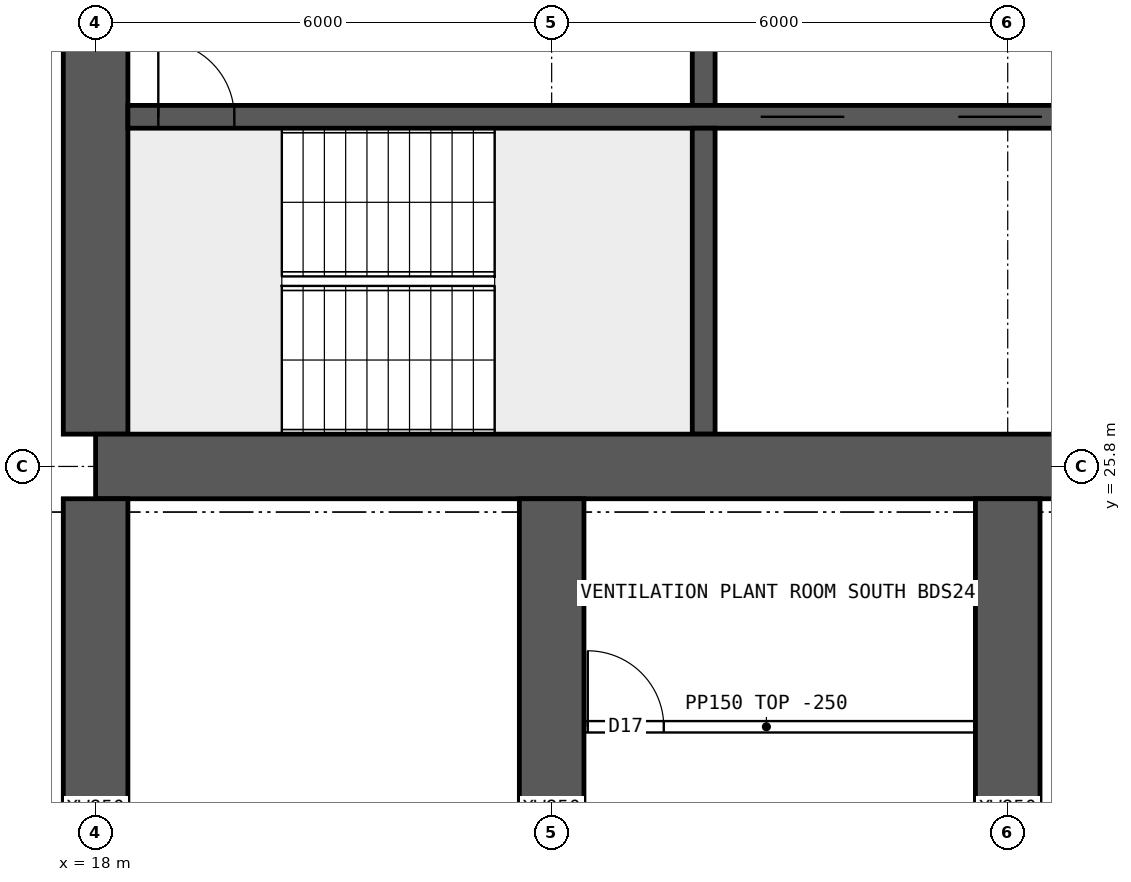
"""IFC4 building model, lengths in metres.
Left out: names, types, materials, properties, quantities, classifications, styles, units other than length and angle.
Written with IfcOpenShell. Run it as: python <this file> out.ifc"""

import sys

from ifc_helpers import new_model, si_unit, direction, frame, frame_2d, origin, place, context, subcontext, project, spatial, rectangle, extrude, element, fill, save


model = new_model("IFC4")
c1 = context("Model", 3, precision=1e-05, world=origin(), true_north=direction((0.0, 1.0)))
c2 = subcontext(c1, "Body", "Model", "MODEL_VIEW")
j1 = project(units=[si_unit("LENGTHUNIT", "METRE"), si_unit("PLANEANGLEUNIT", "RADIAN")], contexts=[c1])
p1 = place(None, origin())
s1 = spatial("IfcSite", under=j1, at=p1, CompositionType="ELEMENT")
p2 = place(p1, origin())
s2 = spatial("IfcBuilding", under=s1, at=p2, CompositionType="ELEMENT")
p3 = place(p2, frame((0.0, 0.0, 186.1)))
s3 = spatial("IfcBuildingStorey", under=s2, at=p3, CompositionType="ELEMENT", Elevation=186.1)
p4 = place(p3, frame((18.0, 25.8, 0.0), z_axis=(0.0, 0.0, 1.0), x_axis=(1.0, 0.0, 0.0)))
e1 = element("IfcWall", 1, at=p4, inside=s3, PredefinedType="SHEAR", context=c2, shape_type="SweptSolid", body=[
    extrude(rectangle(XDim=48.0, YDim=0.85, at=frame_2d((24.0, 0.0))), origin(), (0.0, 0.0, 1.0), 3.75),
])
p5 = place(p3, frame((18.0, 26.225, 0.0), z_axis=(0.0, 0.0, 1.0), x_axis=(0.0, 1.0, 0.0)))
e2 = element("IfcWall", 2, at=p5, inside=s3, PredefinedType="SHEAR", context=c2, shape_type="SweptSolid", body=[
    extrude(rectangle(XDim=11.55, YDim=0.85, at=frame_2d((5.775, 0.0))), origin(), (0.0, 0.0, 1.0), 3.75),
])
p6 = place(p5, frame((5.075, 0.0, 0.0)))
e3 = element("IfcOpeningElement", 3, at=p6, cuts=e2, PredefinedType="OPENING", context=c2, shape_type="SweptSolid", body=[
    extrude(rectangle(XDim=1.2, YDim=2.1, at=frame_2d((0.6, 1.05))), frame((0.0, 0.435, 0.0), z_axis=(0.0, -1.0, 0.0), x_axis=(1.0, 0.0, 0.0)), (0.0, 0.0, 1.0), 0.87),
])
p7 = place(p3, frame((18.425, 30.4, 0.0), z_axis=(0.0, 0.0, 1.0), x_axis=(1.0, 0.0, 0.0)))
e4 = element("IfcWall", 4, at=p7, inside=s3, PredefinedType="SHEAR", context=c2, shape_type="SweptSolid", body=[
    extrude(rectangle(XDim=47.15, YDim=0.3, at=frame_2d((23.575, 0.0))), origin(), (0.0, 0.0, 1.0), 3.75),
])
p8 = place(p7, frame((0.4, 0.0, 0.0)))
e5 = element("IfcOpeningElement", 5, at=p8, cuts=e4, PredefinedType="OPENING", context=c2, shape_type="SweptSolid", body=[
    extrude(rectangle(XDim=1.0, YDim=2.1, at=frame_2d((0.5, 1.05))), frame((0.0, 0.16, 0.0), z_axis=(0.0, -1.0, 0.0), x_axis=(1.0, 0.0, 0.0)), (0.0, 0.0, 1.0), 0.32),
])
p9 = place(p7, frame((45.75, 0.0, 0.0)))
e6 = element("IfcOpeningElement", 6, at=p9, cuts=e4, PredefinedType="OPENING", context=c2, shape_type="SweptSolid", body=[
    extrude(rectangle(XDim=1.0, YDim=2.1, at=frame_2d((0.5, 1.05))), frame((0.0, 0.16, 0.0), z_axis=(0.0, -1.0, 0.0), x_axis=(1.0, 0.0, 0.0)), (0.0, 0.0, 1.0), 0.32),
])
p10 = place(p7, frame((8.325, 0.0, 0.0)))
e7 = element("IfcOpeningElement", 7, at=p10, cuts=e4, PredefinedType="OPENING", context=c2, shape_type="SweptSolid", body=[
    extrude(rectangle(XDim=1.1, YDim=2.1, at=frame_2d((0.55, 1.05))), frame((0.0, 0.16, 0.0), z_axis=(0.0, -1.0, 0.0), x_axis=(1.0, 0.0, 0.0)), (0.0, 0.0, 1.0), 0.32),
])
p11 = place(p7, frame((10.925, 0.0, 0.0)))
e8 = element("IfcOpeningElement", 8, at=p11, cuts=e4, PredefinedType="OPENING", context=c2, shape_type="SweptSolid", body=[
    extrude(rectangle(XDim=1.1, YDim=2.1, at=frame_2d((0.55, 1.05))), frame((0.0, 0.16, 0.0), z_axis=(0.0, -1.0, 0.0), x_axis=(1.0, 0.0, 0.0)), (0.0, 0.0, 1.0), 0.32),
])
p12 = place(p7, frame((13.525, 0.0, 0.0)))
e9 = element("IfcOpeningElement", 9, at=p12, cuts=e4, PredefinedType="OPENING", context=c2, shape_type="SweptSolid", body=[
    extrude(rectangle(XDim=1.1, YDim=2.1, at=frame_2d((0.55, 1.05))), frame((0.0, 0.16, 0.0), z_axis=(0.0, -1.0, 0.0), x_axis=(1.0, 0.0, 0.0)), (0.0, 0.0, 1.0), 0.32),
])
p13 = place(p7, frame((16.125, 0.0, 0.0)))
e10 = element("IfcOpeningElement", 10, at=p13, cuts=e4, PredefinedType="OPENING", context=c2, shape_type="SweptSolid", body=[
    extrude(rectangle(XDim=1.1, YDim=2.1, at=frame_2d((0.55, 1.05))), frame((0.0, 0.16, 0.0), z_axis=(0.0, -1.0, 0.0), x_axis=(1.0, 0.0, 0.0)), (0.0, 0.0, 1.0), 0.32),
])
p14 = place(p7, frame((18.9, 0.0, 0.0)))
e11 = element("IfcOpeningElement", 11, at=p14, cuts=e4, PredefinedType="OPENING", context=c2, shape_type="SweptSolid", body=[
    extrude(rectangle(XDim=0.9, YDim=2.1, at=frame_2d((0.45, 1.05))), frame((0.0, 0.16, 0.0), z_axis=(0.0, -1.0, 0.0), x_axis=(1.0, 0.0, 0.0)), (0.0, 0.0, 1.0), 0.32),
])
p15 = place(p7, frame((30.192, 0.0, 0.0)))
e12 = element("IfcOpeningElement", 12, at=p15, cuts=e4, PredefinedType="OPENING", context=c2, shape_type="SweptSolid", body=[
    extrude(rectangle(XDim=1.1, YDim=2.1, at=frame_2d((0.55, 1.05))), frame((0.0, 0.16, 0.0), z_axis=(0.0, -1.0, 0.0), x_axis=(1.0, 0.0, 0.0)), (0.0, 0.0, 1.0), 0.32),
])
p16 = place(p7, frame((33.725, 0.0, 0.0)))
e13 = element("IfcOpeningElement", 13, at=p16, cuts=e4, PredefinedType="OPENING", context=c2, shape_type="SweptSolid", body=[
    extrude(rectangle(XDim=1.1, YDim=2.1, at=frame_2d((0.55, 1.05))), frame((0.0, 0.16, 0.0), z_axis=(0.0, -1.0, 0.0), x_axis=(1.0, 0.0, 0.0)), (0.0, 0.0, 1.0), 0.32),
])
p17 = place(p7, frame((37.258, 0.0, 0.0)))
e14 = element("IfcOpeningElement", 14, at=p17, cuts=e4, PredefinedType="OPENING", context=c2, shape_type="SweptSolid", body=[
    extrude(rectangle(XDim=1.1, YDim=2.1, at=frame_2d((0.55, 1.05))), frame((0.0, 0.16, 0.0), z_axis=(0.0, -1.0, 0.0), x_axis=(1.0, 0.0, 0.0)), (0.0, 0.0, 1.0), 0.32),
])
p18 = place(p3, frame((26.0, 26.225, 0.0), z_axis=(0.0, 0.0, 1.0), x_axis=(0.0, 1.0, 0.0)))
e15 = element("IfcWall", 15, at=p18, inside=s3, PredefinedType="SHEAR", context=c2, shape_type="SweptSolid", body=[
    extrude(rectangle(XDim=4.025, YDim=0.3, at=frame_2d((2.012, 0.0))), origin(), (0.0, 0.0, 1.0), 3.75),
])
p19 = place(p3, frame((26.0, 30.55, 0.0), z_axis=(0.0, 0.0, 1.0), x_axis=(0.0, 1.0, 0.0)))
e16 = element("IfcWall", 16, at=p19, inside=s3, PredefinedType="SHEAR", context=c2, shape_type="SweptSolid", body=[
    extrude(rectangle(XDim=3.9, YDim=0.3, at=frame_2d((1.95, 0.0))), origin(), (0.0, 0.0, 1.0), 3.75),
])
p20 = place(p19, frame((1.4, 0.0, 0.0)))
e17 = element("IfcOpeningElement", 17, at=p20, cuts=e16, PredefinedType="OPENING", context=c2, shape_type="SweptSolid", body=[
    extrude(rectangle(XDim=1.2, YDim=2.1, at=frame_2d((0.6, 1.05))), frame((0.0, 0.16, 0.0), z_axis=(0.0, -1.0, 0.0), x_axis=(1.0, 0.0, 0.0)), (0.0, 0.0, 1.0), 0.32),
])
for number, where, z_axis, x_axis in (
    (18, (18.0, 17.2, 0.0), (0.0, 0.0, 1.0), (0.0, 1.0, 0.0)),
    (19, (24.0, 17.2, 0.0), (0.0, 0.0, 1.0), (0.0, 1.0, 0.0)),
    (20, (30.0, 17.2, 0.0), (0.0, 0.0, 1.0), (0.0, 1.0, 0.0)),
):
    element("IfcWall", number, at=place(p3, frame(where, z_axis=z_axis, x_axis=x_axis)), inside=s3, PredefinedType="SHEAR", context=c2, shape_type="SweptSolid", body=[
        extrude(rectangle(XDim=8.175, YDim=0.85, at=frame_2d((4.087, 0.0))), origin(), (0.0, 0.0, 1.0), 3.75),
    ])
p21 = place(p3, frame((24.075, 22.375, 0.0), z_axis=(0.0, 0.0, 1.0), x_axis=(1.0, 0.0, 0.0)))
e21 = element("IfcWall", 21, at=p21, inside=s3, PredefinedType="PARTITIONING", context=c2, shape_type="SweptSolid", body=[
    extrude(rectangle(XDim=5.5, YDim=0.15, at=frame_2d((2.75, 0.0))), origin(), (0.0, 0.0, 1.0), 3.5),
])
p22 = place(p21, frame((0.4, 0.0, 0.0)))
e22 = element("IfcOpeningElement", 22, at=p22, cuts=e21, PredefinedType="OPENING", context=c2, shape_type="SweptSolid", body=[
    extrude(rectangle(XDim=1.0, YDim=2.1, at=frame_2d((0.5, 1.05))), frame((0.0, 0.085, 0.0), z_axis=(0.0, -1.0, 0.0), x_axis=(1.0, 0.0, 0.0)), (0.0, 0.0, 1.0), 0.17),
])
p23 = place(p8, origin())
e23 = element("IfcDoor", 23, at=p23, inside=s3, OperationType="SINGLE_SWING_LEFT", PredefinedType="DOOR", context=c2, shape_type="SweptSolid", body=[
    extrude(rectangle(XDim=1.0, YDim=2.1, at=frame_2d((0.5, 1.05))), frame((0.0, 0.025, 0.0), z_axis=(0.0, -1.0, 0.0), x_axis=(1.0, 0.0, 0.0)), (0.0, 0.0, 1.0), 0.05),
])
fill(e5, e23)
p24 = place(p10, origin())
e24 = element("IfcDoor", 24, at=p24, inside=s3, OperationType="DOUBLE_DOOR_SLIDING", PredefinedType="DOOR", context=c2, shape_type="SweptSolid", body=[
    extrude(rectangle(XDim=1.1, YDim=2.1, at=frame_2d((0.55, 1.05))), frame((0.0, 0.025, 0.0), z_axis=(0.0, -1.0, 0.0), x_axis=(1.0, 0.0, 0.0)), (0.0, 0.0, 1.0), 0.05),
])
fill(e7, e24)
p25 = place(p11, origin())
e25 = element("IfcDoor", 25, at=p25, inside=s3, OperationType="DOUBLE_DOOR_SLIDING", PredefinedType="DOOR", context=c2, shape_type="SweptSolid", body=[
    extrude(rectangle(XDim=1.1, YDim=2.1, at=frame_2d((0.55, 1.05))), frame((0.0, 0.025, 0.0), z_axis=(0.0, -1.0, 0.0), x_axis=(1.0, 0.0, 0.0)), (0.0, 0.0, 1.0), 0.05),
])
fill(e8, e25)
p26 = place(p22, origin())
e26 = element("IfcDoor", 26, at=p26, inside=s3, OperationType="SINGLE_SWING_LEFT", PredefinedType="DOOR", context=c2, shape_type="SweptSolid", body=[
    extrude(rectangle(XDim=1.0, YDim=2.1, at=frame_2d((0.5, 1.05))), frame((0.0, 0.025, 0.0), z_axis=(0.0, -1.0, 0.0), x_axis=(1.0, 0.0, 0.0)), (0.0, 0.0, 1.0), 0.05),
])
fill(e22, e26)
save(model, sys.argv[1])
